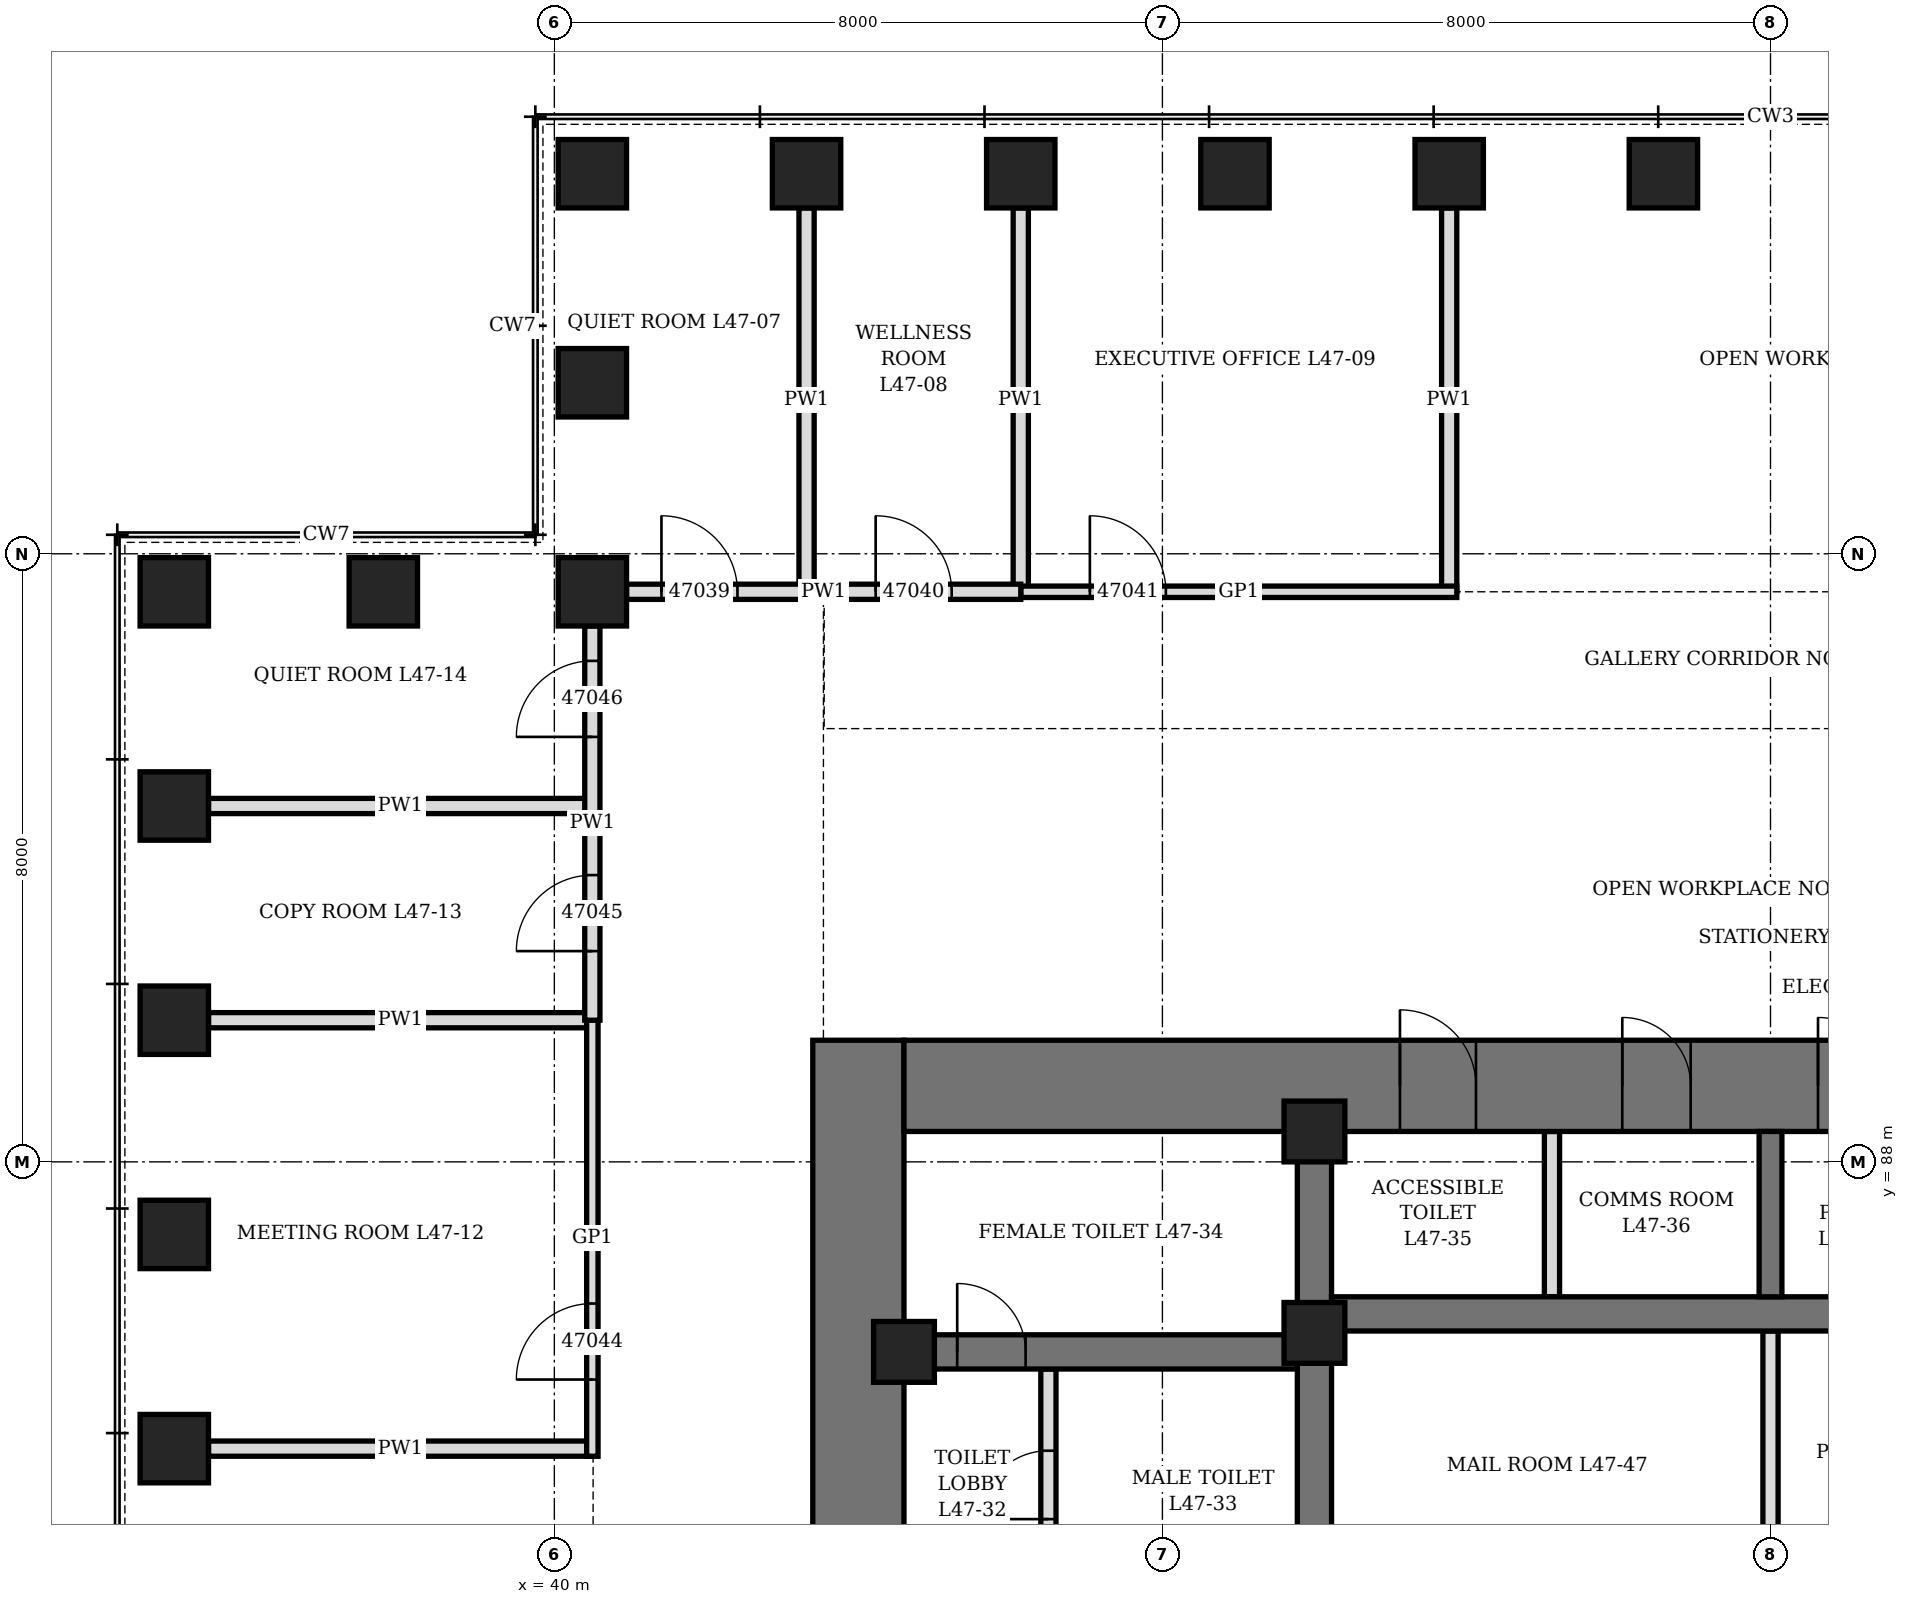
"""IFC4 building model, lengths in metres.
Left out: names, types, materials, properties, quantities, classifications, styles, units other than length and angle.
Written with IfcOpenShell. Run it as: python <this file> out.ifc"""

import sys

from ifc_helpers import new_model, si_unit, direction, frame, frame_2d, origin, origin_2d, place, context, subcontext, project, spatial, rectangle, hollow_rectangle, extrude, element, fill, save


model = new_model("IFC4")
c1 = context("Model", 3, precision=1e-05, world=origin(), true_north=direction((0.0, 1.0)))
c2 = subcontext(c1, "Body", "Model", "MODEL_VIEW")
j1 = project(units=[si_unit("LENGTHUNIT", "METRE"), si_unit("PLANEANGLEUNIT", "RADIAN")], contexts=[c1])
p1 = place(None, origin())
s1 = spatial("IfcSite", under=j1, at=p1, CompositionType="ELEMENT")
p2 = place(p1, origin())
s2 = spatial("IfcBuilding", under=s1, at=p2, CompositionType="ELEMENT")
p3 = place(p2, frame((0.0, 0.0, 210.7)))
s3 = spatial("IfcBuildingStorey", under=s2, at=p3, CompositionType="ELEMENT", Elevation=210.7)
for number, where, z_axis, x_axis in (
    (1, (54.591, 101.0, 0.0), (0.0, 0.0, 1.0), (1.0, 0.0, 0.0)),
    (2, (51.773, 101.0, 0.0), (0.0, 0.0, 1.0), (1.0, 0.0, 0.0)),
    (3, (48.955, 101.0, 0.0), (0.0, 0.0, 1.0), (1.0, 0.0, 0.0)),
    (4, (46.136, 101.0, 0.0), (0.0, 0.0, 1.0), (1.0, 0.0, 0.0)),
    (5, (43.318, 101.0, 0.0), (0.0, 0.0, 1.0), (1.0, 0.0, 0.0)),
    (6, (40.5, 101.0, 0.0), (0.0, 0.0, 1.0), (0.0, 1.0, 0.0)),
    (7, (40.5, 98.25, 0.0), (0.0, 0.0, 1.0), (0.0, 1.0, 0.0)),
    (8, (40.5, 95.5, 0.0), (0.0, 0.0, 1.0), (1.0, 0.0, 0.0)),
    (9, (37.75, 95.5, 0.0), (0.0, 0.0, 1.0), (1.0, 0.0, 0.0)),
    (10, (35.0, 95.5, 0.0), (0.0, 0.0, 1.0), (0.0, 1.0, 0.0)),
    (11, (35.0, 92.682, 0.0), (0.0, 0.0, 1.0), (0.0, 1.0, 0.0)),
    (12, (35.0, 89.864, 0.0), (0.0, 0.0, 1.0), (0.0, 1.0, 0.0)),
    (13, (35.0, 87.045, 0.0), (0.0, 0.0, 1.0), (0.0, 1.0, 0.0)),
    (14, (35.0, 84.227, 0.0), (0.0, 0.0, 1.0), (0.0, 1.0, 0.0)),
):
    element("IfcColumn", number, at=place(p3, frame(where, z_axis=z_axis, x_axis=x_axis)), inside=s3, PredefinedType="COLUMN", context=c2, shape_type="SweptSolid", body=[
        extrude(hollow_rectangle(XDim=0.9, YDim=0.9, WallThickness=0.12, at=origin_2d()), origin(), (0.0, 0.0, 1.0), 4.2),
    ])
p4 = place(p3, frame((44.0, 70.4, 0.0), z_axis=(0.0, 0.0, 1.0), x_axis=(0.0, 1.0, 0.0)))
e15 = element("IfcWall", 15, at=p4, inside=s3, PredefinedType="SHEAR", context=c2, shape_type="SweptSolid", body=[
    extrude(rectangle(XDim=19.2, YDim=1.2, at=frame_2d((9.6, 0.0))), origin(), (0.0, 0.0, 1.0), 4.2),
])
p5 = place(p4, frame((8.6, 0.0, 0.0)))
e16 = element("IfcOpeningElement", 16, at=p5, cuts=e15, PredefinedType="OPENING", context=c2, shape_type="SweptSolid", body=[
    extrude(rectangle(XDim=2.0, YDim=2.4, at=frame_2d((1.0, 1.2))), frame((0.0, 0.61, 0.0), z_axis=(0.0, -1.0, 0.0), x_axis=(1.0, 0.0, 0.0)), (0.0, 0.0, 1.0), 1.22),
])
p6 = place(p3, frame((44.6, 89.0, 0.0), z_axis=(0.0, 0.0, 1.0), x_axis=(1.0, 0.0, 0.0)))
e17 = element("IfcWall", 17, at=p6, inside=s3, PredefinedType="SHEAR", context=c2, shape_type="SweptSolid", body=[
    extrude(rectangle(XDim=22.8, YDim=1.2, at=frame_2d((11.4, 0.0))), origin(), (0.0, 0.0, 1.0), 4.2),
])
p7 = place(p6, frame((6.525, 0.0, 0.0)))
e18 = element("IfcOpeningElement", 18, at=p7, cuts=e17, PredefinedType="OPENING", context=c2, shape_type="SweptSolid", body=[
    extrude(rectangle(XDim=1.0, YDim=2.1, at=frame_2d((0.5, 1.05))), frame((0.0, 0.61, 0.0), z_axis=(0.0, -1.0, 0.0), x_axis=(1.0, 0.0, 0.0)), (0.0, 0.0, 1.0), 1.22),
])
p8 = place(p6, frame((9.45, 0.0, 0.0)))
e19 = element("IfcOpeningElement", 19, at=p8, cuts=e17, PredefinedType="OPENING", context=c2, shape_type="SweptSolid", body=[
    extrude(rectangle(XDim=0.9, YDim=2.1, at=frame_2d((0.45, 1.05))), frame((0.0, 0.61, 0.0), z_axis=(0.0, -1.0, 0.0), x_axis=(1.0, 0.0, 0.0)), (0.0, 0.0, 1.0), 1.22),
])
p9 = place(p6, frame((12.025, 0.0, 0.0)))
e20 = element("IfcOpeningElement", 20, at=p9, cuts=e17, PredefinedType="OPENING", context=c2, shape_type="SweptSolid", body=[
    extrude(rectangle(XDim=0.9, YDim=2.1, at=frame_2d((0.45, 1.05))), frame((0.0, 0.61, 0.0), z_axis=(0.0, -1.0, 0.0), x_axis=(1.0, 0.0, 0.0)), (0.0, 0.0, 1.0), 1.22),
])
p10 = place(p6, frame((13.962, 0.0, 0.0)))
e21 = element("IfcOpeningElement", 21, at=p10, cuts=e17, PredefinedType="OPENING", context=c2, shape_type="SweptSolid", body=[
    extrude(rectangle(XDim=0.9, YDim=2.1, at=frame_2d((0.45, 1.05))), frame((0.0, 0.61, 0.0), z_axis=(0.0, -1.0, 0.0), x_axis=(1.0, 0.0, 0.0)), (0.0, 0.0, 1.0), 1.22),
])
p11 = place(p3, frame((50.0, 71.6, 0.0), z_axis=(0.0, 0.0, 1.0), x_axis=(0.0, 1.0, 0.0)))
e22 = element("IfcWall", 22, at=p11, inside=s3, PredefinedType="SHEAR", context=c2, shape_type="SweptSolid", body=[
    extrude(rectangle(XDim=16.8, YDim=0.45, at=frame_2d((8.4, 0.0))), origin(), (0.0, 0.0, 1.0), 4.2),
])
p12 = place(p11, frame((7.5, 0.0, 0.0)))
e23 = element("IfcOpeningElement", 23, at=p12, cuts=e22, PredefinedType="OPENING", context=c2, shape_type="SweptSolid", body=[
    extrude(rectangle(XDim=1.8, YDim=2.4, at=frame_2d((0.9, 1.2))), frame((0.0, 0.235, 0.0), z_axis=(0.0, -1.0, 0.0), x_axis=(1.0, 0.0, 0.0)), (0.0, 0.0, 1.0), 0.47),
])
p13 = place(p3, frame((44.6, 85.5, 0.0), z_axis=(0.0, 0.0, 1.0), x_axis=(1.0, 0.0, 0.0)))
e24 = element("IfcWall", 24, at=p13, inside=s3, PredefinedType="SHEAR", context=c2, shape_type="SweptSolid", body=[
    extrude(rectangle(XDim=5.175, YDim=0.45, at=frame_2d((2.587, 0.0))), origin(), (0.0, 0.0, 1.0), 4.2),
])
p14 = place(p13, frame((0.7, 0.0, 0.0)))
e25 = element("IfcOpeningElement", 25, at=p14, cuts=e24, PredefinedType="OPENING", context=c2, shape_type="SweptSolid", body=[
    extrude(rectangle(XDim=0.9, YDim=2.1, at=frame_2d((0.45, 1.05))), frame((0.0, 0.235, 0.0), z_axis=(0.0, -1.0, 0.0), x_axis=(1.0, 0.0, 0.0)), (0.0, 0.0, 1.0), 0.47),
])
p15 = place(p3, frame((50.225, 86.0, 0.0), z_axis=(0.0, 0.0, 1.0), x_axis=(1.0, 0.0, 0.0)))
e26 = element("IfcWall", 26, at=p15, inside=s3, PredefinedType="SHEAR", context=c2, shape_type="SweptSolid", body=[
    extrude(rectangle(XDim=11.55, YDim=0.45, at=frame_2d((5.775, 0.0))), origin(), (0.0, 0.0, 1.0), 4.2),
])
p16 = place(p3, frame((56.0, 86.225, 0.0), z_axis=(0.0, 0.0, 1.0), x_axis=(0.0, 1.0, 0.0)))
e27 = element("IfcWall", 27, at=p16, inside=s3, PredefinedType="SHEAR", context=c2, shape_type="SweptSolid", body=[
    extrude(rectangle(XDim=2.175, YDim=0.3, at=frame_2d((1.087, 0.0))), origin(), (0.0, 0.0, 1.0), 4.2),
])
for number, where, z_axis, x_axis in (
    (28, (44.6, 85.5, 0.0), (0.0, 0.0, 1.0), (1.0, 0.0, 0.0)),
    (29, (50.0, 85.75, 0.0), (0.0, 0.0, 1.0), (1.0, 0.0, 0.0)),
    (30, (50.0, 88.4, 0.0), (0.0, 0.0, 1.0), (1.0, 0.0, 0.0)),
):
    element("IfcColumn", number, at=place(p3, frame(where, z_axis=z_axis, x_axis=x_axis)), inside=s3, PredefinedType="COLUMN", context=c2, shape_type="SweptSolid", body=[
        extrude(hollow_rectangle(XDim=0.8, YDim=0.8, WallThickness=0.1, at=origin_2d()), origin(), (0.0, 0.0, 1.0), 4.2),
    ])
p17 = place(p3, frame((46.5, 82.225, 0.0), z_axis=(0.0, 0.0, 1.0), x_axis=(0.0, 1.0, 0.0)))
e31 = element("IfcWall", 31, at=p17, inside=s3, PredefinedType="PARTITIONING", context=c2, shape_type="SweptSolid", body=[
    extrude(rectangle(XDim=3.05, YDim=0.2, at=frame_2d((1.525, 0.0))), origin(), (0.0, 0.0, 1.0), 4.04),
])
p18 = place(p17, frame((1.075, 0.0, 0.0)))
e32 = element("IfcOpeningElement", 32, at=p18, cuts=e31, PredefinedType="OPENING", context=c2, shape_type="SweptSolid", body=[
    extrude(rectangle(XDim=0.9, YDim=2.1, at=frame_2d((0.45, 1.05))), frame((0.0, 0.11, 0.0), z_axis=(0.0, -1.0, 0.0), x_axis=(1.0, 0.0, 0.0)), (0.0, 0.0, 1.0), 0.22),
])
p19 = place(p3, frame((53.125, 86.225, 0.0), z_axis=(0.0, 0.0, 1.0), x_axis=(0.0, 1.0, 0.0)))
e33 = element("IfcWall", 33, at=p19, inside=s3, PredefinedType="PARTITIONING", context=c2, shape_type="SweptSolid", body=[
    extrude(rectangle(XDim=2.175, YDim=0.2, at=frame_2d((1.087, 0.0))), origin(), (0.0, 0.0, 1.0), 4.04),
])
p20 = place(p3, frame((56.0, 82.225, 0.0), z_axis=(0.0, 0.0, 1.0), x_axis=(0.0, 1.0, 0.0)))
e34 = element("IfcWall", 34, at=p20, inside=s3, PredefinedType="PARTITIONING", context=c2, shape_type="SweptSolid", body=[
    extrude(rectangle(XDim=3.55, YDim=0.2, at=frame_2d((1.775, 0.0))), origin(), (0.0, 0.0, 1.0), 3.14),
])
for number, where, z_axis, x_axis in (
    (35, (43.318, 95.5, 0.0), (0.0, 0.0, 1.0), (0.0, 1.0, 0.0)),
    (36, (46.136, 95.5, 0.0), (0.0, 0.0, 1.0), (0.0, 1.0, 0.0)),
    (37, (51.773, 95.5, 0.0), (0.0, 0.0, 1.0), (0.0, 1.0, 0.0)),
    (38, (35.45, 84.227, 0.0), (0.0, 0.0, 1.0), (1.0, 0.0, 0.0)),
    (39, (35.45, 89.864, 0.0), (0.0, 0.0, 1.0), (1.0, 0.0, 0.0)),
    (40, (35.45, 92.682, 0.0), (0.0, 0.0, 1.0), (1.0, 0.0, 0.0)),
):
    element("IfcWall", number, at=place(p3, frame(where, z_axis=z_axis, x_axis=x_axis)), inside=s3, PredefinedType="PARTITIONING", context=c2, shape_type="SweptSolid", body=[
        extrude(rectangle(XDim=5.05, YDim=0.2, at=frame_2d((2.525, 0.0))), origin(), (0.0, 0.0, 1.0), 3.428),
    ])
p21 = place(p3, frame((46.136, 95.5, 0.0), z_axis=(0.0, 0.0, 1.0), x_axis=(1.0, 0.0, 0.0)))
e41 = element("IfcWall", 41, at=p21, inside=s3, PredefinedType="PARTITIONING", context=c2, shape_type="SweptSolid", body=[
    extrude(rectangle(XDim=5.736, YDim=0.15, at=frame_2d((2.868, 0.0))), origin(), (0.0, 0.0, 1.0), 4.04),
])
p22 = place(p21, frame((0.909, 0.0, 0.0)))
e42 = element("IfcOpeningElement", 42, at=p22, cuts=e41, PredefinedType="OPENING", context=c2, shape_type="SweptSolid", body=[
    extrude(rectangle(XDim=1.0, YDim=2.1, at=frame_2d((0.5, 1.05))), frame((0.0, 0.085, 0.0), z_axis=(0.0, -1.0, 0.0), x_axis=(1.0, 0.0, 0.0)), (0.0, 0.0, 1.0), 0.17),
])
p23 = place(p3, frame((40.95, 95.5, 0.0), z_axis=(0.0, 0.0, 1.0), x_axis=(1.0, 0.0, 0.0)))
e43 = element("IfcWall", 43, at=p23, inside=s3, PredefinedType="PARTITIONING", context=c2, shape_type="SweptSolid", body=[
    extrude(rectangle(XDim=5.187, YDim=0.2, at=frame_2d((2.593, 0.0))), origin(), (0.0, 0.0, 1.0), 4.04),
])
p24 = place(p23, frame((0.459, 0.0, 0.0)))
e44 = element("IfcOpeningElement", 44, at=p24, cuts=e43, PredefinedType="OPENING", context=c2, shape_type="SweptSolid", body=[
    extrude(rectangle(XDim=1.0, YDim=2.1, at=frame_2d((0.5, 1.05))), frame((0.0, 0.11, 0.0), z_axis=(0.0, -1.0, 0.0), x_axis=(1.0, 0.0, 0.0)), (0.0, 0.0, 1.0), 0.22),
])
p25 = place(p23, frame((3.277, 0.0, 0.0)))
e45 = element("IfcOpeningElement", 45, at=p25, cuts=e43, PredefinedType="OPENING", context=c2, shape_type="SweptSolid", body=[
    extrude(rectangle(XDim=1.0, YDim=2.1, at=frame_2d((0.5, 1.05))), frame((0.0, 0.11, 0.0), z_axis=(0.0, -1.0, 0.0), x_axis=(1.0, 0.0, 0.0)), (0.0, 0.0, 1.0), 0.22),
])
p26 = place(p3, frame((40.5, 84.127, 0.0), z_axis=(0.0, 0.0, 1.0), x_axis=(0.0, 1.0, 0.0)))
e46 = element("IfcWall", 46, at=p26, inside=s3, PredefinedType="PARTITIONING", context=c2, shape_type="SweptSolid", body=[
    extrude(rectangle(XDim=5.736, YDim=0.15, at=frame_2d((2.868, 0.0))), origin(), (0.0, 0.0, 1.0), 4.04),
])
p27 = place(p26, frame((1.009, 0.0, 0.0)))
e47 = element("IfcOpeningElement", 47, at=p27, cuts=e46, PredefinedType="OPENING", context=c2, shape_type="SweptSolid", body=[
    extrude(rectangle(XDim=1.0, YDim=2.4, at=frame_2d((0.5, 1.2))), frame((0.0, 0.085, 0.0), z_axis=(0.0, -1.0, 0.0), x_axis=(1.0, 0.0, 0.0)), (0.0, 0.0, 1.0), 0.17),
])
p28 = place(p3, frame((40.5, 89.864, 0.0), z_axis=(0.0, 0.0, 1.0), x_axis=(0.0, 1.0, 0.0)))
e48 = element("IfcWall", 48, at=p28, inside=s3, PredefinedType="PARTITIONING", context=c2, shape_type="SweptSolid", body=[
    extrude(rectangle(XDim=5.187, YDim=0.2, at=frame_2d((2.593, 0.0))), origin(), (0.0, 0.0, 1.0), 4.04),
])
p29 = place(p28, frame((0.909, 0.0, 0.0)))
e49 = element("IfcOpeningElement", 49, at=p29, cuts=e48, PredefinedType="OPENING", context=c2, shape_type="SweptSolid", body=[
    extrude(rectangle(XDim=1.0, YDim=2.1, at=frame_2d((0.5, 1.05))), frame((0.0, 0.11, 0.0), z_axis=(0.0, -1.0, 0.0), x_axis=(1.0, 0.0, 0.0)), (0.0, 0.0, 1.0), 0.22),
])
p30 = place(p28, frame((3.727, 0.0, 0.0)))
e50 = element("IfcOpeningElement", 50, at=p30, cuts=e48, PredefinedType="OPENING", context=c2, shape_type="SweptSolid", body=[
    extrude(rectangle(XDim=1.0, YDim=2.1, at=frame_2d((0.5, 1.05))), frame((0.0, 0.11, 0.0), z_axis=(0.0, -1.0, 0.0), x_axis=(1.0, 0.0, 0.0)), (0.0, 0.0, 1.0), 0.22),
])
p31 = place(p18, origin())
e51 = element("IfcDoor", 51, at=p31, inside=s3, OperationType="SINGLE_SWING_RIGHT", PredefinedType="DOOR", context=c2, shape_type="SweptSolid", body=[
    extrude(rectangle(XDim=0.9, YDim=2.1, at=frame_2d((0.45, 1.05))), frame((0.0, 0.1, 0.0), z_axis=(0.0, -1.0, 0.0), x_axis=(1.0, 0.0, 0.0)), (0.0, 0.0, 1.0), 0.199),
])
fill(e32, e51)
p32 = place(p14, origin())
e52 = element("IfcDoor", 52, at=p32, inside=s3, OperationType="SINGLE_SWING_RIGHT", PredefinedType="DOOR", context=c2, shape_type="SweptSolid", body=[
    extrude(rectangle(XDim=0.9, YDim=2.1, at=frame_2d((0.45, 1.05))), frame((0.0, 0.225, 0.0), z_axis=(0.0, -1.0, 0.0), x_axis=(1.0, 0.0, 0.0)), (0.0, 0.0, 1.0), 0.449),
])
fill(e25, e52)
p33 = place(p7, origin())
e53 = element("IfcDoor", 53, at=p33, inside=s3, OperationType="SINGLE_SWING_LEFT", PredefinedType="DOOR", context=c2, shape_type="SweptSolid", body=[
    extrude(rectangle(XDim=1.0, YDim=2.1, at=frame_2d((0.5, 1.05))), frame((0.0, 0.35, 0.0), z_axis=(0.0, -1.0, 0.0), x_axis=(1.0, 0.0, 0.0)), (0.0, 0.0, 1.0), 0.7),
])
fill(e18, e53)
p34 = place(p8, origin())
e54 = element("IfcDoor", 54, at=p34, inside=s3, OperationType="SINGLE_SWING_LEFT", PredefinedType="DOOR", context=c2, shape_type="SweptSolid", body=[
    extrude(rectangle(XDim=0.9, YDim=2.1, at=frame_2d((0.45, 1.05))), frame((0.0, 0.35, 0.0), z_axis=(0.0, -1.0, 0.0), x_axis=(1.0, 0.0, 0.0)), (0.0, 0.0, 1.0), 0.7),
])
fill(e19, e54)
p35 = place(p9, origin())
e55 = element("IfcDoor", 55, at=p35, inside=s3, OperationType="SINGLE_SWING_LEFT", PredefinedType="DOOR", context=c2, shape_type="SweptSolid", body=[
    extrude(rectangle(XDim=0.9, YDim=2.1, at=frame_2d((0.45, 1.05))), frame((0.0, 0.35, 0.0), z_axis=(0.0, -1.0, 0.0), x_axis=(1.0, 0.0, 0.0)), (0.0, 0.0, 1.0), 0.7),
])
fill(e20, e55)
p36 = place(p24, origin())
e56 = element("IfcDoor", 56, at=p36, inside=s3, OperationType="SINGLE_SWING_LEFT", PredefinedType="DOOR", context=c2, shape_type="SweptSolid", body=[
    extrude(rectangle(XDim=1.0, YDim=2.1, at=frame_2d((0.5, 1.05))), frame((0.0, 0.1, 0.0), z_axis=(0.0, -1.0, 0.0), x_axis=(1.0, 0.0, 0.0)), (0.0, 0.0, 1.0), 0.199),
])
fill(e44, e56)
p37 = place(p25, origin())
e57 = element("IfcDoor", 57, at=p37, inside=s3, OperationType="SINGLE_SWING_LEFT", PredefinedType="DOOR", context=c2, shape_type="SweptSolid", body=[
    extrude(rectangle(XDim=1.0, YDim=2.1, at=frame_2d((0.5, 1.05))), frame((0.0, 0.1, 0.0), z_axis=(0.0, -1.0, 0.0), x_axis=(1.0, 0.0, 0.0)), (0.0, 0.0, 1.0), 0.199),
])
fill(e45, e57)
p38 = place(p22, origin())
e58 = element("IfcDoor", 58, at=p38, inside=s3, OperationType="SINGLE_SWING_LEFT", PredefinedType="DOOR", context=c2, shape_type="SweptSolid", body=[
    extrude(rectangle(XDim=1.0, YDim=2.1, at=frame_2d((0.5, 1.05))), frame((0.0, 0.075, 0.0), z_axis=(0.0, -1.0, 0.0), x_axis=(1.0, 0.0, 0.0)), (0.0, 0.0, 1.0), 0.149),
])
fill(e42, e58)
p39 = place(p27, origin())
e59 = element("IfcDoor", 59, at=p39, inside=s3, OperationType="SINGLE_SWING_RIGHT", PredefinedType="DOOR", context=c2, shape_type="SweptSolid", body=[
    extrude(rectangle(XDim=1.0, YDim=2.4, at=frame_2d((0.5, 1.2))), frame((0.0, 0.075, 0.0), z_axis=(0.0, -1.0, 0.0), x_axis=(1.0, 0.0, 0.0)), (0.0, 0.0, 1.0), 0.149),
])
fill(e47, e59)
p40 = place(p29, origin())
e60 = element("IfcDoor", 60, at=p40, inside=s3, OperationType="SINGLE_SWING_LEFT", PredefinedType="DOOR", context=c2, shape_type="SweptSolid", body=[
    extrude(rectangle(XDim=1.0, YDim=2.1, at=frame_2d((0.5, 1.05))), frame((0.0, 0.1, 0.0), z_axis=(0.0, -1.0, 0.0), x_axis=(1.0, 0.0, 0.0)), (0.0, 0.0, 1.0), 0.199),
])
fill(e49, e60)
p41 = place(p30, origin())
e61 = element("IfcDoor", 61, at=p41, inside=s3, OperationType="SINGLE_SWING_LEFT", PredefinedType="DOOR", context=c2, shape_type="SweptSolid", body=[
    extrude(rectangle(XDim=1.0, YDim=2.1, at=frame_2d((0.5, 1.05))), frame((0.0, 0.1, 0.0), z_axis=(0.0, -1.0, 0.0), x_axis=(1.0, 0.0, 0.0)), (0.0, 0.0, 1.0), 0.199),
])
fill(e50, e61)
save(model, sys.argv[1])
